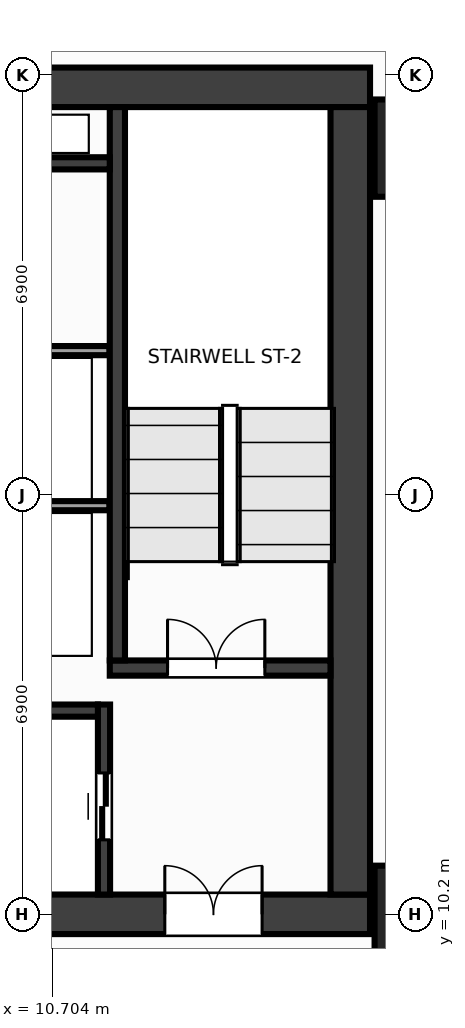
"""IFC4 building model, lengths in metres.
Left out: names, types, materials, properties, quantities, classifications, styles, units other than length and angle.
Written with IfcOpenShell. Run it as: python <this file> out.ifc"""

import sys

from ifc_helpers import new_model, si_unit, direction, frame, frame_2d, origin, origin_2d, place, context, subcontext, project, spatial, rectangle, extrude, source, transform, mapped, element, fill, save


model = new_model("IFC4")
c1 = context("Model", 3, precision=1e-05, world=origin(), true_north=direction((0.0, 1.0)))
c2 = subcontext(c1, "Body", "Model", "MODEL_VIEW")
j1 = project(units=[si_unit("LENGTHUNIT", "METRE"), si_unit("PLANEANGLEUNIT", "RADIAN")], contexts=[c1])
p1 = place(None, origin())
s1 = spatial("IfcSite", under=j1, at=p1, CompositionType="ELEMENT")
p2 = place(p1, origin())
s2 = spatial("IfcBuilding", under=s1, at=p2, CompositionType="ELEMENT")
p3 = place(p2, frame((0.0, 0.0, 182.0)))
s3 = spatial("IfcBuildingStorey", under=s2, at=p3, CompositionType="ELEMENT", Elevation=182.0)
m1 = source(origin(), c2, "Body", "SweptSolid", [
    extrude(rectangle(XDim=31.85, YDim=0.65, at=frame_2d((15.925, 0.0))), origin(), (0.0, 0.0, 1.0), 3.6),
])
p4 = place(p3, frame((-15.925, 23.8, 0.0), z_axis=(0.0, 0.0, 1.0), x_axis=(1.0, 0.0, 0.0)))
e1 = element("IfcWall", 1, at=p4, inside=s3, PredefinedType="SHEAR", context=c2, shape_type="MappedRepresentation", body=[
    mapped(m1, transform((0.0, 0.0, 0.0), x_axis=(1.0, 0.0, 0.0), y_axis=(0.0, 1.0, 0.0), z_axis=(0.0, 0.0, 1.0), scale=1.0)),
])
p5 = place(p3, frame((-15.925, 10.2, 0.0), z_axis=(0.0, 0.0, 1.0), x_axis=(1.0, 0.0, 0.0)))
e2 = element("IfcWall", 2, at=p5, inside=s3, PredefinedType="SHEAR", context=c2, shape_type="MappedRepresentation", body=[
    mapped(m1, transform((0.0, 0.0, 0.0), x_axis=(1.0, 0.0, 0.0), y_axis=(0.0, 1.0, 0.0), z_axis=(0.0, 0.0, 1.0), scale=1.0)),
])
p6 = place(p5, frame((1.775, 0.0, 0.0)))
e3 = element("IfcOpeningElement", 3, at=p6, cuts=e2, PredefinedType="OPENING", context=c2, shape_type="SweptSolid", body=[
    extrude(rectangle(XDim=1.6, YDim=2.15, at=frame_2d((0.8, 1.075))), frame((0.0, 0.337, 0.0), z_axis=(0.0, -1.0, 0.0), x_axis=(1.0, 0.0, 0.0)), (0.0, 0.0, 1.0), 0.674),
])
p7 = place(p5, frame((28.475, 0.0, 0.0)))
e4 = element("IfcOpeningElement", 4, at=p7, cuts=e2, PredefinedType="OPENING", context=c2, shape_type="SweptSolid", body=[
    extrude(rectangle(XDim=1.6, YDim=2.15, at=frame_2d((0.8, 1.075))), frame((0.0, 0.337, 0.0), z_axis=(0.0, -1.0, 0.0), x_axis=(1.0, 0.0, 0.0)), (0.0, 0.0, 1.0), 0.674),
])
p8 = place(p5, frame((15.175, 0.0, 0.0)))
e5 = element("IfcOpeningElement", 5, at=p8, cuts=e2, PredefinedType="OPENING", context=c2, shape_type="SweptSolid", body=[
    extrude(rectangle(XDim=1.5, YDim=2.2, at=frame_2d((0.75, 1.1))), frame((0.0, 0.337, 0.0), z_axis=(0.0, -1.0, 0.0), x_axis=(1.0, 0.0, 0.0)), (0.0, 0.0, 1.0), 0.674),
])
m2 = source(origin(), c2, "Body", "SweptSolid", [
    extrude(rectangle(XDim=12.95, YDim=0.65, at=frame_2d((6.475, 0.0))), origin(), (0.0, 0.0, 1.0), 3.6),
])
p9 = place(p3, frame((15.6, 10.525, 0.0), z_axis=(0.0, 0.0, 1.0), x_axis=(0.0, 1.0, 0.0)))
e6 = element("IfcWall", 6, at=p9, inside=s3, PredefinedType="SHEAR", context=c2, shape_type="MappedRepresentation", body=[
    mapped(m2, transform((0.0, 0.0, 0.0), x_axis=(1.0, 0.0, 0.0), y_axis=(0.0, 1.0, 0.0), z_axis=(0.0, 0.0, 1.0), scale=1.0)),
])
m3 = source(origin(), c2, "Body", "SweptSolid", [
    extrude(rectangle(XDim=3.63, YDim=0.25, at=frame_2d((1.815, 0.0))), origin(), (0.0, 0.0, 1.0), 3.6),
])
p10 = place(p3, frame((11.645, 14.25, 0.0), z_axis=(0.0, 0.0, 1.0), x_axis=(1.0, 0.0, 0.0)))
e7 = element("IfcWall", 7, at=p10, inside=s3, PredefinedType="SHEAR", context=c2, shape_type="MappedRepresentation", body=[
    mapped(m3, transform((0.0, 0.0, 0.0), x_axis=(1.0, 0.0, 0.0), y_axis=(0.0, 1.0, 0.0), z_axis=(0.0, 0.0, 1.0), scale=1.0)),
])
p11 = place(p10, frame((0.95, 0.0, 0.0)))
e8 = element("IfcOpeningElement", 8, at=p11, cuts=e7, PredefinedType="OPENING", context=c2, shape_type="SweptSolid", body=[
    extrude(rectangle(XDim=1.6, YDim=2.15, at=frame_2d((0.8, 1.075))), frame((0.0, 0.137, 0.0), z_axis=(0.0, -1.0, 0.0), x_axis=(1.0, 0.0, 0.0)), (0.0, 0.0, 1.0), 0.274),
])
m4 = source(origin(), c2, "Body", "SweptSolid", [
    extrude(rectangle(XDim=9.1, YDim=0.25, at=frame_2d((4.55, 0.0))), origin(), (0.0, 0.0, 1.0), 3.6),
])
p12 = place(p3, frame((11.77, 14.375, 0.0), z_axis=(0.0, 0.0, 1.0), x_axis=(0.0, 1.0, 0.0)))
e9 = element("IfcWall", 9, at=p12, inside=s3, PredefinedType="SHEAR", context=c2, shape_type="MappedRepresentation", body=[
    mapped(m4, transform((0.0, 0.0, 0.0), x_axis=(1.0, 0.0, 0.0), y_axis=(0.0, 1.0, 0.0), z_axis=(0.0, 0.0, 1.0), scale=1.0)),
])
m5 = source(origin(), c2, "Body", "SweptSolid", [
    extrude(rectangle(XDim=3.125, YDim=0.2, at=frame_2d((1.562, 0.0))), origin(), (0.0, 0.0, 1.0), 3.6),
])
p13 = place(p3, frame((11.55, 10.525, 0.0), z_axis=(0.0, 0.0, 1.0), x_axis=(0.0, 1.0, 0.0)))
e10 = element("IfcWall", 10, at=p13, inside=s3, PredefinedType="SHEAR", context=c2, shape_type="MappedRepresentation", body=[
    mapped(m5, transform((0.0, 0.0, 0.0), x_axis=(1.0, 0.0, 0.0), y_axis=(0.0, 1.0, 0.0), z_axis=(0.0, 0.0, 1.0), scale=1.0)),
])
p14 = place(p13, frame((0.9, 0.0, 0.0)))
e11 = element("IfcOpeningElement", 11, at=p14, cuts=e10, PredefinedType="OPENING", context=c2, shape_type="SweptSolid", body=[
    extrude(rectangle(XDim=1.1, YDim=2.15, at=frame_2d((0.55, 1.075))), frame((0.0, 0.112, 0.0), z_axis=(0.0, -1.0, 0.0), x_axis=(1.0, 0.0, 0.0)), (0.0, 0.0, 1.0), 0.224),
])
m6 = source(origin(), c2, "Body", "SweptSolid", [
    extrude(rectangle(XDim=2.825, YDim=0.2, at=frame_2d((1.413, 0.0))), origin(), (0.0, 0.0, 1.0), 3.6),
])
p15 = place(p3, frame((8.625, 13.55, 0.0), z_axis=(0.0, 0.0, 1.0), x_axis=(1.0, 0.0, 0.0)))
e12 = element("IfcWall", 12, at=p15, inside=s3, PredefinedType="SHEAR", context=c2, shape_type="MappedRepresentation", body=[
    mapped(m6, transform((0.0, 0.0, 0.0), x_axis=(1.0, 0.0, 0.0), y_axis=(0.0, 1.0, 0.0), z_axis=(0.0, 0.0, 1.0), scale=1.0)),
])
m7 = source(origin(), c2, "Body", "SweptSolid", [
    extrude(rectangle(XDim=3.02, YDim=0.2, at=frame_2d((1.51, 0.0))), origin(), (0.0, 0.0, 1.0), 3.6),
])
p16 = place(p3, frame((8.625, 22.55, 0.0), z_axis=(0.0, 0.0, 1.0), x_axis=(1.0, 0.0, 0.0)))
e13 = element("IfcWall", 13, at=p16, inside=s3, PredefinedType="SHEAR", context=c2, shape_type="MappedRepresentation", body=[
    mapped(m7, transform((0.0, 0.0, 0.0), x_axis=(1.0, 0.0, 0.0), y_axis=(0.0, 1.0, 0.0), z_axis=(0.0, 0.0, 1.0), scale=1.0)),
])
m8 = source(origin(), c2, "Body", "SweptSolid", [
    extrude(rectangle(XDim=1.6, YDim=1.6, at=origin_2d()), origin(), (0.0, 0.0, 1.0), 3.6),
])
for number, where, z_axis, x_axis in (
    (14, (16.8, 10.2, 0.0), (0.0, 0.0, 1.0), (1.0, 0.0, 0.0)),
    (15, (16.8, 22.8, 0.0), (0.0, 0.0, 1.0), (1.0, 0.0, 0.0)),
):
    element("IfcColumn", number, at=place(p3, frame(where, z_axis=z_axis, x_axis=x_axis)), inside=s3, PredefinedType="COLUMN", context=c2, shape_type="MappedRepresentation", body=[
        mapped(m8, transform((0.0, 0.0, 0.0), x_axis=(1.0, 0.0, 0.0), y_axis=(0.0, 1.0, 0.0), z_axis=(0.0, 0.0, 1.0), scale=1.0)),
    ])
m9 = source(origin(), c2, "Body", "SweptSolid", [
    extrude(rectangle(XDim=3.01, YDim=0.15, at=frame_2d((1.505, 0.0))), origin(), (0.0, 0.0, 1.0), 3.38),
])
for number, where, z_axis, x_axis in (
    (16, (8.63, 16.92, 0.0), (0.0, 0.0, 1.0), (1.0, 0.0, 0.0)),
    (17, (8.63, 19.47, 0.0), (0.0, 0.0, 1.0), (1.0, 0.0, 0.0)),
):
    element("IfcWall", number, at=place(p3, frame(where, z_axis=z_axis, x_axis=x_axis)), inside=s3, PredefinedType="PARTITIONING", context=c2, shape_type="MappedRepresentation", body=[
        mapped(m9, transform((0.0, 0.0, 0.0), x_axis=(1.0, 0.0, 0.0), y_axis=(0.0, 1.0, 0.0), z_axis=(0.0, 0.0, 1.0), scale=1.0)),
    ])
m10 = source(origin(), c2, "Body", "SweptSolid", [
    extrude(rectangle(XDim=1.6, YDim=2.15, at=frame_2d((0.8, 1.075))), frame((0.0, 0.025, 0.0), z_axis=(0.0, -1.0, 0.0), x_axis=(1.0, 0.0, 0.0)), (0.0, 0.0, 1.0), 0.05),
])
p17 = place(p11, origin())
e18 = element("IfcDoor", 18, at=p17, inside=s3, OperationType="DOUBLE_DOOR_SINGLE_SWING", PredefinedType="DOOR", context=c2, shape_type="MappedRepresentation", body=[
    mapped(m10, transform((0.0, 0.0, 0.0), x_axis=(1.0, 0.0, 0.0), y_axis=(0.0, 1.0, 0.0), z_axis=(0.0, 0.0, 1.0), scale=1.0)),
])
fill(e8, e18)
p18 = place(p7, origin())
e19 = element("IfcDoor", 19, at=p18, inside=s3, OperationType="DOUBLE_DOOR_SINGLE_SWING", PredefinedType="DOOR", context=c2, shape_type="MappedRepresentation", body=[
    mapped(m10, transform((0.0, 0.0, 0.0), x_axis=(1.0, 0.0, 0.0), y_axis=(0.0, 1.0, 0.0), z_axis=(0.0, 0.0, 1.0), scale=1.0)),
])
fill(e4, e19)
m11 = source(origin(), c2, "Body", "SweptSolid", [
    extrude(rectangle(XDim=1.1, YDim=2.15, at=frame_2d((0.55, 1.075))), frame((0.0, 0.025, 0.0), z_axis=(0.0, -1.0, 0.0), x_axis=(1.0, 0.0, 0.0)), (0.0, 0.0, 1.0), 0.05),
])
p19 = place(p14, origin())
e20 = element("IfcDoor", 20, at=p19, inside=s3, OperationType="DOUBLE_DOOR_SLIDING", PredefinedType="DOOR", context=c2, shape_type="MappedRepresentation", body=[
    mapped(m11, transform((0.0, 0.0, 0.0), x_axis=(1.0, 0.0, 0.0), y_axis=(0.0, 1.0, 0.0), z_axis=(0.0, 0.0, 1.0), scale=1.0)),
])
fill(e11, e20)
save(model, sys.argv[1])
